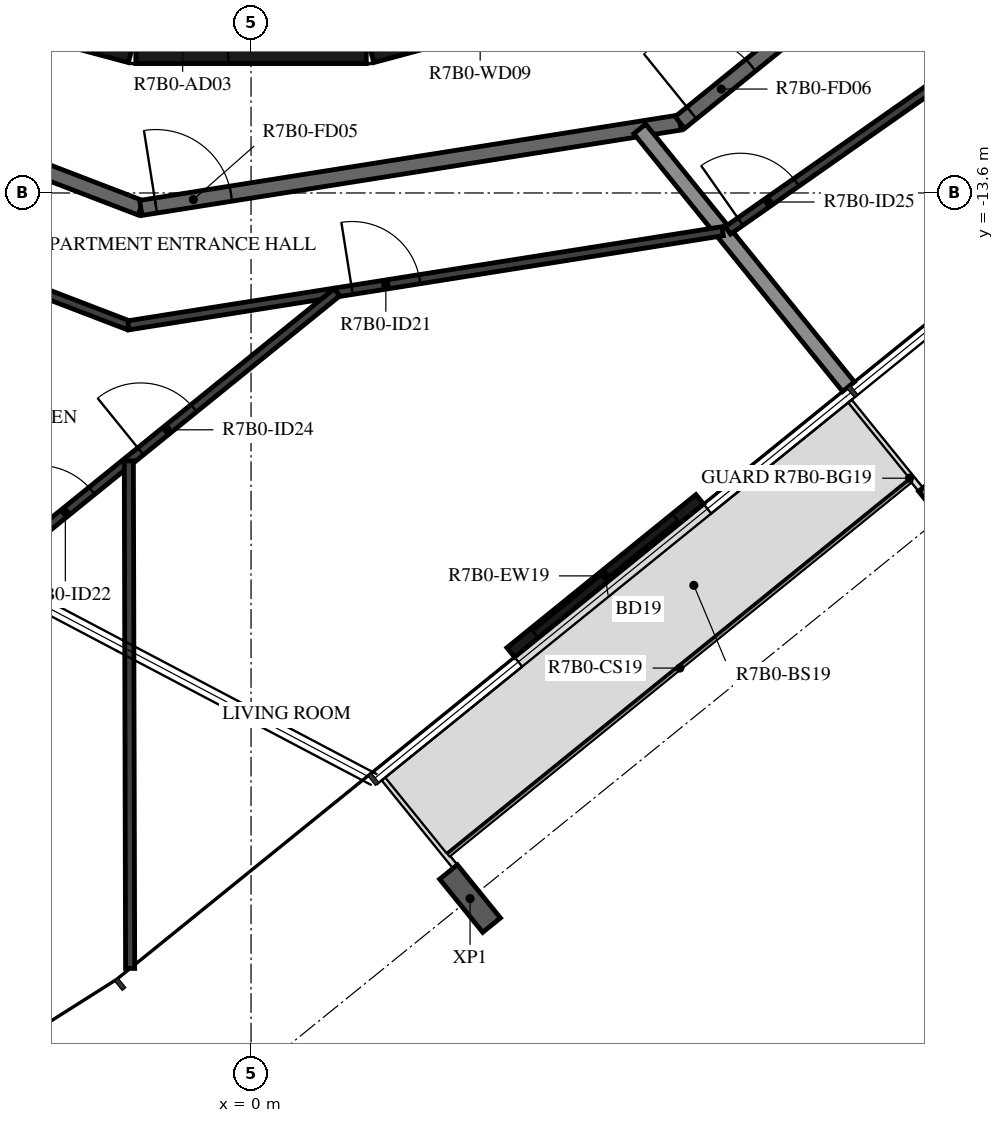
"""IFC4 building model, lengths in metres.
Left out: names, types, materials, properties, quantities, classifications, styles, units other than length and angle.
Written with IfcOpenShell. Run it as: python <this file> out.ifc"""

import sys

from ifc_helpers import new_model, si_unit, direction, frame, frame_2d, origin, origin_2d, place, context, subcontext, project, spatial, rectangle, i_section, extrude, element, fill, save


model = new_model("IFC4")
c1 = context("Model", 3, precision=1e-05, world=origin(), true_north=direction((0.0, 1.0)))
c2 = subcontext(c1, "Body", "Model", "MODEL_VIEW")
j1 = project(units=[si_unit("LENGTHUNIT", "METRE"), si_unit("PLANEANGLEUNIT", "RADIAN")], contexts=[c1])
p1 = place(None, origin())
s1 = spatial("IfcSite", under=j1, at=p1, CompositionType="ELEMENT")
p2 = place(p1, origin())
s2 = spatial("IfcBuilding", under=s1, at=p2, CompositionType="ELEMENT")
p3 = place(p2, frame((0.0, 0.0, 277.4)))
s3 = spatial("IfcBuildingStorey", under=s2, at=p3, CompositionType="ELEMENT", Elevation=277.4)
for number, where, z_axis, x_axis in (
    (1, (2.881, -22.883, -0.38), (0.0, 0.0, 1.0), (-0.777, -0.629, 0.0)),
    (2, (9.182, -17.781, -0.38), (0.0, 0.0, 1.0), (-0.777, -0.629, 0.0)),
):
    element("IfcColumn", number, at=place(p3, frame(where, z_axis=z_axis, x_axis=x_axis)), inside=s3, PredefinedType="COLUMN", context=c2, shape_type="SweptSolid", body=[
        extrude(i_section(OverallWidth=0.3, OverallDepth=0.9, WebThickness=0.019, FlangeThickness=0.035, FilletRadius=0.03, at=origin_2d()), origin(), (0.0, 0.0, 1.0), 3.5),
    ])
p4 = place(p3, frame((3.417, -19.645, 0.0), z_axis=(0.0, 0.0, 1.0), x_axis=(0.777125818, 0.629345265333, 0.0)))
e3 = element("IfcWall", 3, at=p4, inside=s3, PredefinedType="STANDARD", context=c2, shape_type="SweptSolid", body=[
    extrude(rectangle(XDim=3.2, YDim=0.16, at=frame_2d((1.6, 0.0))), origin(), (0.0, 0.0, 1.0), 3.12),
])
p5 = place(p4, frame((0.4, 0.0, 0.0)))
e4 = element("IfcOpeningElement", 4, at=p5, cuts=e3, PredefinedType="OPENING", context=c2, shape_type="SweptSolid", body=[
    extrude(rectangle(XDim=2.4, YDim=2.4, at=frame_2d((1.2, 1.2))), frame((0.0, 0.09, 0.0), z_axis=(0.0, -1.0, 0.0), x_axis=(1.0, 0.0, 0.0)), (0.0, 0.0, 1.0), 0.18),
])
p6 = place(p3, frame((1.55, -11.643, 0.0), z_axis=(0.0, 0.0, 1.0), x_axis=(0.965948410781, 0.258734743916, 0.0)))
e5 = element("IfcWall", 5, at=p6, inside=s3, PredefinedType="SHEAR", context=c2, shape_type="SweptSolid", body=[
    extrude(rectangle(XDim=3.033, YDim=0.5, at=frame_2d((1.516, 0.0))), origin(), (0.0, 0.0, 1.0), 3.12),
])
p7 = place(p6, frame((1.066, 0.0, 0.0)))
e6 = element("IfcOpeningElement", 6, at=p7, cuts=e5, PredefinedType="OPENING", context=c2, shape_type="SweptSolid", body=[
    extrude(rectangle(XDim=0.9, YDim=2.1, at=frame_2d((0.45, 1.05))), frame((0.0, 0.26, 0.0), z_axis=(0.0, -1.0, 0.0), x_axis=(1.0, 0.0, 0.0)), (0.0, 0.0, 1.0), 0.52),
])
p8 = place(p3, frame((-4.479, -10.858, 0.0), z_axis=(0.0, 0.0, 1.0), x_axis=(0.965948410781, -0.258734743916, 0.0)))
e7 = element("IfcWall", 7, at=p8, inside=s3, PredefinedType="SHEAR", context=c2, shape_type="SweptSolid", body=[
    extrude(rectangle(XDim=3.033, YDim=0.5, at=frame_2d((1.516, 0.0))), origin(), (0.0, 0.0, 1.0), 3.12),
])
p9 = place(p3, frame((-1.516, -11.647, 0.0), z_axis=(0.0, 0.0, 1.0), x_axis=(1.0, 0.0, 0.0)))
e8 = element("IfcWall", 8, at=p9, inside=s3, PredefinedType="SHEAR", context=c2, shape_type="SweptSolid", body=[
    extrude(rectangle(XDim=3.033, YDim=0.5, at=frame_2d((1.516, 0.0))), origin(), (0.0, 0.0, 1.0), 3.12),
])
p10 = place(p9, frame((0.016, 0.0, 0.0)))
e9 = element("IfcOpeningElement", 9, at=p10, cuts=e8, PredefinedType="OPENING", context=c2, shape_type="SweptSolid", body=[
    extrude(rectangle(XDim=1.2, YDim=2.1, at=frame_2d((0.6, 1.05))), frame((0.0, 0.26, 0.0), z_axis=(0.0, -1.0, 0.0), x_axis=(1.0, 0.0, 0.0)), (0.0, 0.0, 1.0), 0.52),
])
p11 = place(p3, frame((-8.154, -11.223, 0.0), z_axis=(0.0, 0.0, 1.0), x_axis=(0.93359073609, -0.358341090983, 0.0)))
e10 = element("IfcWall", 10, at=p11, inside=s3, PredefinedType="STANDARD", context=c2, shape_type="SweptSolid", body=[
    extrude(rectangle(XDim=7.181, YDim=0.2, at=frame_2d((3.59, 0.0))), origin(), (0.0, 0.0, 1.0), 3.12),
])
p12 = place(p11, frame((2.39, 0.0, 0.0)))
e11 = element("IfcOpeningElement", 11, at=p12, cuts=e10, PredefinedType="OPENING", context=c2, shape_type="SweptSolid", body=[
    extrude(rectangle(XDim=1.0, YDim=2.1, at=frame_2d((0.5, 1.05))), frame((0.0, 0.11, 0.0), z_axis=(0.0, -1.0, 0.0), x_axis=(1.0, 0.0, 0.0)), (0.0, 0.0, 1.0), 0.22),
])
p13 = place(p3, frame((-1.45, -13.797, 0.0), z_axis=(0.0, 0.0, 1.0), x_axis=(0.987690361611, 0.156421704315, 0.0)))
e12 = element("IfcWall", 12, at=p13, inside=s3, PredefinedType="STANDARD", context=c2, shape_type="SweptSolid", body=[
    extrude(rectangle(XDim=7.181, YDim=0.2, at=frame_2d((3.591, 0.0))), origin(), (0.0, 0.0, 1.0), 3.12),
])
p14 = place(p13, frame((0.2, 0.0, 0.0)))
e13 = element("IfcOpeningElement", 13, at=p14, cuts=e12, PredefinedType="OPENING", context=c2, shape_type="SweptSolid", body=[
    extrude(rectangle(XDim=1.0, YDim=2.1, at=frame_2d((0.5, 1.05))), frame((0.0, 0.11, 0.0), z_axis=(0.0, -1.0, 0.0), x_axis=(1.0, 0.0, 0.0)), (0.0, 0.0, 1.0), 0.22),
])
p15 = place(p3, frame((5.643, -12.673, 0.0), z_axis=(0.0, 0.0, 1.0), x_axis=(0.777160148113, 0.629302871585, 0.0)))
e14 = element("IfcWall", 14, at=p15, inside=s3, PredefinedType="STANDARD", context=c2, shape_type="SweptSolid", body=[
    extrude(rectangle(XDim=7.181, YDim=0.2, at=frame_2d((3.59, 0.0))), origin(), (0.0, 0.0, 1.0), 3.12),
])
p16 = place(p15, frame((0.2, 0.0, 0.0)))
e15 = element("IfcOpeningElement", 15, at=p16, cuts=e14, PredefinedType="OPENING", context=c2, shape_type="SweptSolid", body=[
    extrude(rectangle(XDim=1.0, YDim=2.1, at=frame_2d((0.5, 1.05))), frame((0.0, 0.11, 0.0), z_axis=(0.0, -1.0, 0.0), x_axis=(1.0, 0.0, 0.0)), (0.0, 0.0, 1.0), 0.22),
])
p17 = place(p3, frame((7.861, -16.148, 0.0), z_axis=(0.0, 0.0, 1.0), x_axis=(-0.629330189513, 0.777138026716, 0.0)))
e16 = element("IfcWall", 16, at=p17, inside=s3, PredefinedType="STANDARD", context=c2, shape_type="SweptSolid", body=[
    extrude(rectangle(XDim=4.364, YDim=0.2, at=frame_2d((2.182, 0.0))), origin(), (0.0, 0.0, 1.0), 2.73),
])
p18 = place(p3, frame((-9.067, -12.479, 0.0), z_axis=(0.0, 0.0, 1.0), x_axis=(0.933579449035, -0.358370495911, 0.0)))
e17 = element("IfcWall", 17, at=p18, inside=s3, PredefinedType="PARTITIONING", context=c2, shape_type="SweptSolid", body=[
    extrude(rectangle(XDim=7.985, YDim=0.12, at=frame_2d((3.992, 0.0))), origin(), (0.0, 0.0, 1.0), 3.12),
])
p19 = place(p18, frame((4.192, 0.0, 0.0)))
e18 = element("IfcOpeningElement", 18, at=p19, cuts=e17, PredefinedType="OPENING", context=c2, shape_type="SweptSolid", body=[
    extrude(rectangle(XDim=0.9, YDim=2.1, at=frame_2d((0.45, 1.05))), frame((0.0, 0.07, 0.0), z_axis=(0.0, -1.0, 0.0), x_axis=(1.0, 0.0, 0.0)), (0.0, 0.0, 1.0), 0.14),
])
p20 = place(p3, frame((-1.612, -15.341, 0.0), z_axis=(0.0, 0.0, 1.0), x_axis=(0.987687560018, 0.15643939333, 0.0)))
e19 = element("IfcWall", 19, at=p20, inside=s3, PredefinedType="PARTITIONING", context=c2, shape_type="SweptSolid", body=[
    extrude(rectangle(XDim=7.914, YDim=0.12, at=frame_2d((3.957, 0.0))), origin(), (0.0, 0.0, 1.0), 3.12),
])
p21 = place(p20, frame((2.978, 0.0, 0.0)))
e20 = element("IfcOpeningElement", 20, at=p21, cuts=e19, PredefinedType="OPENING", context=c2, shape_type="SweptSolid", body=[
    extrude(rectangle(XDim=0.9, YDim=2.1, at=frame_2d((0.45, 1.05))), frame((0.0, 0.07, 0.0), z_axis=(0.0, -1.0, 0.0), x_axis=(1.0, 0.0, 0.0)), (0.0, 0.0, 1.0), 0.14),
])
p22 = place(p3, frame((-4.809, -19.717, 0.0), z_axis=(0.0, 0.0, 1.0), x_axis=(0.777140730041, 0.629326851255, 0.0)))
e21 = element("IfcWall", 21, at=p22, inside=s3, PredefinedType="PARTITIONING", context=c2, shape_type="SweptSolid", body=[
    extrude(rectangle(XDim=7.644, YDim=0.12, at=frame_2d((3.822, 0.0))), origin(), (0.0, 0.0, 1.0), 3.12),
])
p23 = place(p22, frame((2.594, 0.0, 0.0)))
e22 = element("IfcOpeningElement", 22, at=p23, cuts=e21, PredefinedType="OPENING", context=c2, shape_type="SweptSolid", body=[
    extrude(rectangle(XDim=0.9, YDim=2.1, at=frame_2d((0.45, 1.05))), frame((0.0, 0.07, 0.0), z_axis=(0.0, -1.0, 0.0), x_axis=(1.0, 0.0, 0.0)), (0.0, 0.0, 1.0), 0.14),
])
p24 = place(p22, frame((0.3, 0.0, 0.0)))
e23 = element("IfcOpeningElement", 23, at=p24, cuts=e21, PredefinedType="OPENING", context=c2, shape_type="SweptSolid", body=[
    extrude(rectangle(XDim=0.8, YDim=2.1, at=frame_2d((0.4, 1.05))), frame((0.0, 0.07, 0.0), z_axis=(0.0, -1.0, 0.0), x_axis=(1.0, 0.0, 0.0)), (0.0, 0.0, 1.0), 0.14),
])
p25 = place(p22, frame((4.319, 0.0, 0.0)))
e24 = element("IfcOpeningElement", 24, at=p25, cuts=e21, PredefinedType="OPENING", context=c2, shape_type="SweptSolid", body=[
    extrude(rectangle(XDim=0.9, YDim=2.1, at=frame_2d((0.45, 1.05))), frame((0.0, 0.07, 0.0), z_axis=(0.0, -1.0, 0.0), x_axis=(1.0, 0.0, 0.0)), (0.0, 0.0, 1.0), 0.14),
])
p26 = place(p3, frame((-1.591, -23.802, 0.0), z_axis=(0.0, 0.0, 1.0), x_axis=(-0.002595969315, 0.999996630466, 0.0)))
e25 = element("IfcWall", 25, at=p26, inside=s3, PredefinedType="PARTITIONING", context=c2, shape_type="SweptSolid", body=[
    extrude(rectangle(XDim=6.677, YDim=0.12, at=frame_2d((3.339, 0.0))), origin(), (0.0, 0.0, 1.0), 3.12),
])
p27 = place(p3, frame((6.274, -14.092, 0.0), z_axis=(0.0, 0.0, 1.0), x_axis=(0.818755256003, 0.574142691992, 0.0)))
e26 = element("IfcWall", 26, at=p27, inside=s3, PredefinedType="PARTITIONING", context=c2, shape_type="SweptSolid", body=[
    extrude(rectangle(XDim=5.08, YDim=0.12, at=frame_2d((2.54, 0.0))), origin(), (0.0, 0.0, 1.0), 3.12),
])
p28 = place(p27, frame((0.2, 0.0, 0.0)))
e27 = element("IfcOpeningElement", 27, at=p28, cuts=e26, PredefinedType="OPENING", context=c2, shape_type="SweptSolid", body=[
    extrude(rectangle(XDim=0.9, YDim=2.1, at=frame_2d((0.45, 1.05))), frame((0.0, 0.07, 0.0), z_axis=(0.0, -1.0, 0.0), x_axis=(1.0, 0.0, 0.0)), (0.0, 0.0, 1.0), 0.14),
])
p29 = place(p5, origin())
e28 = element("IfcDoor", 28, at=p29, inside=s3, OperationType="DOUBLE_DOOR_SLIDING", PredefinedType="DOOR", context=c2, shape_type="SweptSolid", body=[
    extrude(rectangle(XDim=2.4, YDim=2.4, at=frame_2d((1.2, 1.2))), frame((0.0, 0.025, 0.0), z_axis=(0.0, -1.0, 0.0), x_axis=(1.0, 0.0, 0.0)), (0.0, 0.0, 1.0), 0.05),
])
fill(e4, e28)
p30 = place(p14, origin())
e29 = element("IfcDoor", 29, at=p30, inside=s3, OperationType="SINGLE_SWING_LEFT", PredefinedType="DOOR", context=c2, shape_type="SweptSolid", body=[
    extrude(rectangle(XDim=1.0, YDim=2.1, at=frame_2d((0.5, 1.05))), frame((0.0, 0.025, 0.0), z_axis=(0.0, -1.0, 0.0), x_axis=(1.0, 0.0, 0.0)), (0.0, 0.0, 1.0), 0.05),
])
fill(e13, e29)
p31 = place(p21, origin())
e30 = element("IfcDoor", 30, at=p31, inside=s3, OperationType="SINGLE_SWING_LEFT", PredefinedType="DOOR", context=c2, shape_type="SweptSolid", body=[
    extrude(rectangle(XDim=0.9, YDim=2.1, at=frame_2d((0.45, 1.05))), frame((0.0, 0.025, 0.0), z_axis=(0.0, -1.0, 0.0), x_axis=(1.0, 0.0, 0.0)), (0.0, 0.0, 1.0), 0.05),
])
fill(e20, e30)
p32 = place(p23, origin())
e31 = element("IfcDoor", 31, at=p32, inside=s3, OperationType="SINGLE_SWING_LEFT", PredefinedType="DOOR", context=c2, shape_type="SweptSolid", body=[
    extrude(rectangle(XDim=0.9, YDim=2.1, at=frame_2d((0.45, 1.05))), frame((0.0, 0.025, 0.0), z_axis=(0.0, -1.0, 0.0), x_axis=(1.0, 0.0, 0.0)), (0.0, 0.0, 1.0), 0.05),
])
fill(e22, e31)
p33 = place(p25, origin())
e32 = element("IfcDoor", 32, at=p33, inside=s3, OperationType="SINGLE_SWING_RIGHT", PredefinedType="DOOR", context=c2, shape_type="SweptSolid", body=[
    extrude(rectangle(XDim=0.9, YDim=2.1, at=frame_2d((0.45, 1.05))), frame((0.0, 0.025, 0.0), z_axis=(0.0, -1.0, 0.0), x_axis=(1.0, 0.0, 0.0)), (0.0, 0.0, 1.0), 0.05),
])
fill(e24, e32)
p34 = place(p16, origin())
e33 = element("IfcDoor", 33, at=p34, inside=s3, OperationType="SINGLE_SWING_LEFT", PredefinedType="DOOR", context=c2, shape_type="SweptSolid", body=[
    extrude(rectangle(XDim=1.0, YDim=2.1, at=frame_2d((0.5, 1.05))), frame((0.0, 0.025, 0.0), z_axis=(0.0, -1.0, 0.0), x_axis=(1.0, 0.0, 0.0)), (0.0, 0.0, 1.0), 0.05),
])
fill(e15, e33)
p35 = place(p28, origin())
e34 = element("IfcDoor", 34, at=p35, inside=s3, OperationType="SINGLE_SWING_LEFT", PredefinedType="DOOR", context=c2, shape_type="SweptSolid", body=[
    extrude(rectangle(XDim=0.9, YDim=2.1, at=frame_2d((0.45, 1.05))), frame((0.0, 0.025, 0.0), z_axis=(0.0, -1.0, 0.0), x_axis=(1.0, 0.0, 0.0)), (0.0, 0.0, 1.0), 0.05),
])
fill(e27, e34)
save(model, sys.argv[1])
